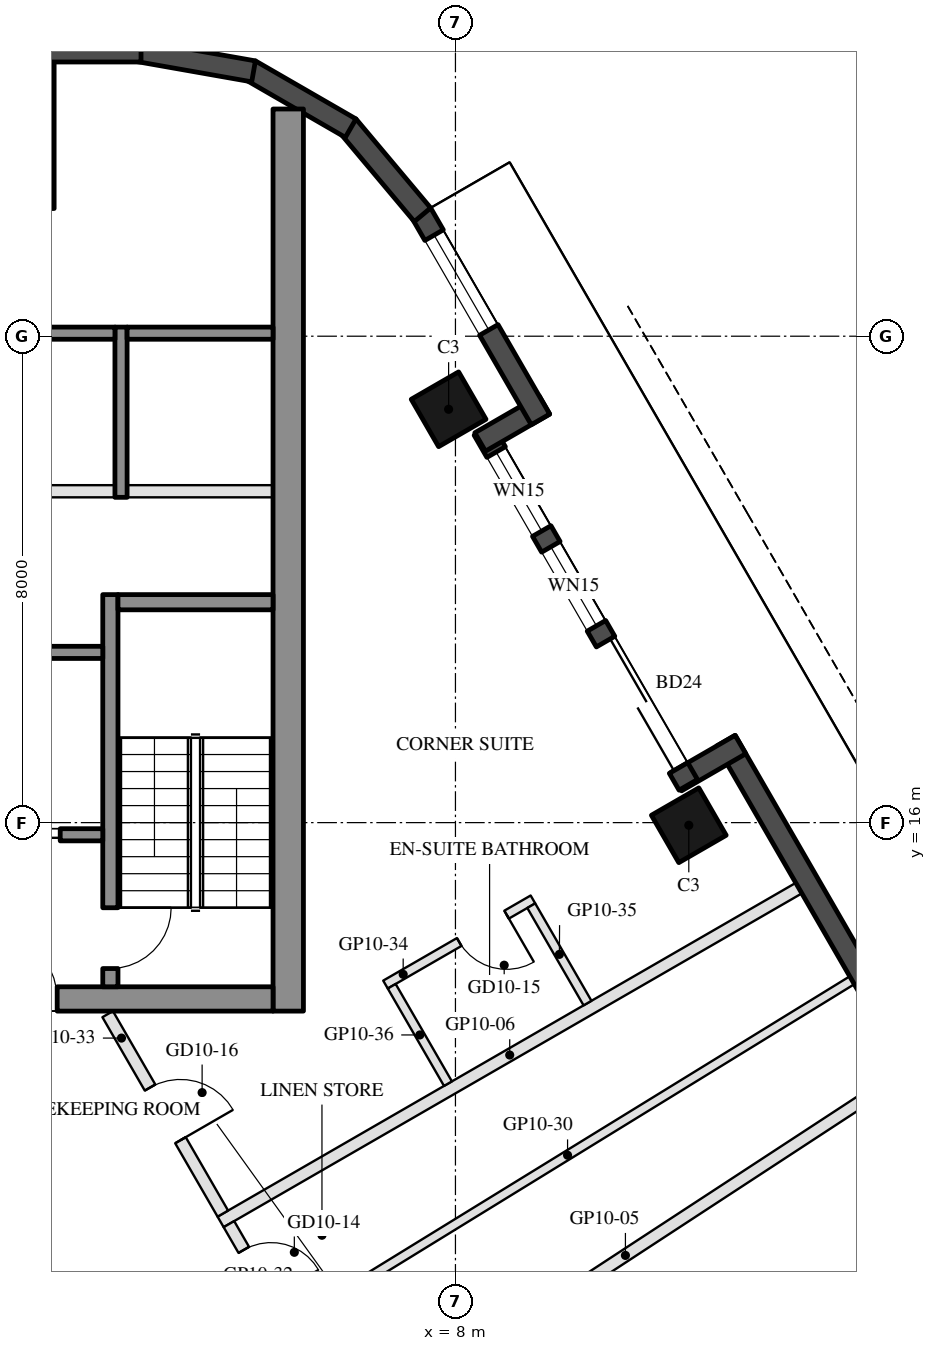
"""IFC4 building model, lengths in metres.
Left out: names, types, materials, properties, quantities, classifications, styles, units other than length and angle.
Written with IfcOpenShell. Run it as: python <this file> out.ifc"""

import sys

from ifc_helpers import new_model, si_unit, direction, frame, frame_2d, origin, origin_2d, place, context, subcontext, project, spatial, rectangle, hollow_rectangle, extrude, element, fill, save


model = new_model("IFC4")
c1 = context("Model", 3, precision=1e-05, world=origin(), true_north=direction((0.0, 1.0)))
c2 = subcontext(c1, "Body", "Model", "MODEL_VIEW")
j1 = project(units=[si_unit("LENGTHUNIT", "METRE"), si_unit("PLANEANGLEUNIT", "RADIAN")], contexts=[c1])
p1 = place(None, origin())
s1 = spatial("IfcSite", under=j1, at=p1, CompositionType="ELEMENT")
p2 = place(p1, origin())
s2 = spatial("IfcBuilding", under=s1, at=p2, CompositionType="ELEMENT")
p3 = place(p2, frame((0.0, 0.0, 116.8)))
s3 = spatial("IfcBuildingStorey", under=s2, at=p3, CompositionType="ELEMENT", Elevation=116.8)
for number, where, z_axis, x_axis in (
    (1, (11.838, 15.957, 0.0), (0.0, 0.0, 1.0), (-0.5, 0.866, 0.0)),
    (2, (7.888, 22.798, 0.0), (0.0, 0.0, 1.0), (-0.5, 0.866, 0.0)),
):
    element("IfcColumn", number, at=place(p3, frame(where, z_axis=z_axis, x_axis=x_axis)), inside=s3, PredefinedType="COLUMN", context=c2, shape_type="SweptSolid", body=[
        extrude(hollow_rectangle(XDim=0.9, YDim=0.9, WallThickness=0.04, at=origin_2d()), origin(), (0.0, 0.0, 1.0), 3.7),
    ])
p4 = place(p3, frame((0.0, 27.3, 0.0), z_axis=(0.0, 0.0, 1.0), x_axis=(1.0, 0.0, 0.0)))
e3 = element("IfcColumn", 3, at=p4, inside=s3, PredefinedType="COLUMN", context=c2, shape_type="SweptSolid", body=[
    extrude(hollow_rectangle(XDim=2.8, YDim=2.4, WallThickness=0.07, at=origin_2d()), origin(), (0.0, 0.0, 1.0), 3.7),
])
p5 = place(p3, frame((17.299, 8.948, 0.0), z_axis=(0.0, 0.0, 1.0), x_axis=(-0.500010041276, 0.866019606374, 0.0)))
e4 = element("IfcWall", 4, at=p5, inside=s3, PredefinedType="SOLIDWALL", context=c2, shape_type="SweptSolid", body=[
    extrude(rectangle(XDim=9.7, YDim=0.35, at=frame_2d((4.85, 0.0))), origin(), (0.0, 0.0, 1.0), 3.55),
])
p6 = place(p5, frame((1.725, 0.0, 0.0)))
e5 = element("IfcOpeningElement", 5, at=p6, cuts=e4, PredefinedType="OPENING", context=c2, shape_type="SweptSolid", body=[
    extrude(rectangle(XDim=1.3, YDim=2.4, at=frame_2d((0.65, 1.2))), frame((0.0, 0.185, 0.0), z_axis=(0.0, -1.0, 0.0), x_axis=(1.0, 0.0, 0.0)), (0.0, 0.0, 1.0), 0.37),
])
p7 = place(p3, frame((12.688, 17.284, 0.0), z_axis=(0.0, 0.0, 1.0), x_axis=(-0.865955602162, -0.500120880472, 0.0)))
e6 = element("IfcWall", 6, at=p7, inside=s3, PredefinedType="SOLIDWALL", context=c2, shape_type="SweptSolid", body=[
    extrude(rectangle(XDim=1.22, YDim=0.35, at=frame_2d((0.61, 0.0))), origin(), (0.0, 0.0, 1.0), 3.55),
])
p8 = place(p3, frame((11.829, 16.621, 0.0), z_axis=(0.0, 0.0, 1.0), x_axis=(-0.500003597184, 0.866023326939, 0.0)))
e7 = element("IfcWall", 7, at=p8, inside=s3, PredefinedType="SOLIDWALL", context=c2, shape_type="SweptSolid", body=[
    extrude(rectangle(XDim=6.74, YDim=0.35, at=frame_2d((3.37, 0.0))), origin(), (0.0, 0.0, 1.0), 3.55),
])
p9 = place(p8, frame((0.32, 0.0, 0.0)))
e8 = element("IfcOpeningElement", 8, at=p9, cuts=e7, PredefinedType="OPENING", context=c2, shape_type="SweptSolid", body=[
    extrude(rectangle(XDim=2.4, YDim=2.4, at=frame_2d((1.2, 1.2))), frame((0.0, 0.185, 0.0), z_axis=(0.0, -1.0, 0.0), x_axis=(1.0, 0.0, 0.0)), (0.0, 0.0, 1.0), 0.37),
])
p10 = place(p8, frame((3.02, 0.0, 0.3)))
e9 = element("IfcOpeningElement", 9, at=p10, cuts=e7, PredefinedType="OPENING", context=c2, shape_type="SweptSolid", body=[
    extrude(rectangle(XDim=1.5, YDim=2.65, at=frame_2d((0.75, 1.325))), frame((0.0, 0.185, 0.0), z_axis=(0.0, -1.0, 0.0), x_axis=(1.0, 0.0, 0.0)), (0.0, 0.0, 1.0), 0.37),
])
p11 = place(p8, frame((4.82, 0.0, 0.3)))
e10 = element("IfcOpeningElement", 10, at=p11, cuts=e7, PredefinedType="OPENING", context=c2, shape_type="SweptSolid", body=[
    extrude(rectangle(XDim=1.5, YDim=2.65, at=frame_2d((0.75, 1.325))), frame((0.0, 0.185, 0.0), z_axis=(0.0, -1.0, 0.0), x_axis=(1.0, 0.0, 0.0)), (0.0, 0.0, 1.0), 0.37),
])
p12 = place(p3, frame((8.406, 22.26, 0.0), z_axis=(0.0, 0.0, 1.0), x_axis=(0.865955602162, 0.500120880472, 0.0)))
e11 = element("IfcWall", 11, at=p12, inside=s3, PredefinedType="SOLIDWALL", context=c2, shape_type="SweptSolid", body=[
    extrude(rectangle(XDim=1.22, YDim=0.35, at=frame_2d((0.61, 0.0))), origin(), (0.0, 0.0, 1.0), 3.55),
])
p13 = place(p3, frame((9.398, 22.631, 0.0), z_axis=(0.0, 0.0, 1.0), x_axis=(-0.499954521343, 0.866051659307, 0.0)))
e12 = element("IfcWall", 12, at=p13, inside=s3, PredefinedType="SOLIDWALL", context=c2, shape_type="SweptSolid", body=[
    extrude(rectangle(XDim=3.916, YDim=0.35, at=frame_2d((1.958, 0.0))), origin(), (0.0, 0.0, 1.0), 3.55),
])
p14 = place(p13, frame((1.7, 0.0, 0.3)))
e13 = element("IfcOpeningElement", 13, at=p14, cuts=e12, PredefinedType="OPENING", context=c2, shape_type="SweptSolid", body=[
    extrude(rectangle(XDim=1.8, YDim=2.65, at=frame_2d((0.9, 1.325))), frame((0.0, 0.185, 0.0), z_axis=(0.0, -1.0, 0.0), x_axis=(1.0, 0.0, 0.0)), (0.0, 0.0, 1.0), 0.37),
])
p15 = place(p3, frame((7.458, 25.998, 0.0), z_axis=(0.0, 0.0, 1.0), x_axis=(-0.642808304945, 0.766027077259, 0.0)))
e14 = element("IfcWall", 14, at=p15, inside=s3, PredefinedType="SOLIDWALL", context=c2, shape_type="SweptSolid", body=[
    extrude(rectangle(XDim=1.91, YDim=0.35, at=frame_2d((0.955, 0.0))), origin(), (0.0, 0.0, 1.0), 3.55),
])
for number, where, z_axis, x_axis in (
    (15, (6.277, 27.422, 0.0), (0.0, 0.0, 1.0), (-0.866, 0.5, 0.0)),
    (16, (4.68, 28.356, 0.0), (0.0, 0.0, 1.0), (-0.985, 0.174, 0.0)),
):
    element("IfcWall", number, at=place(p3, frame(where, z_axis=z_axis, x_axis=x_axis)), inside=s3, PredefinedType="SOLIDWALL", context=c2, shape_type="SweptSolid", body=[
        extrude(rectangle(XDim=1.91, YDim=0.35, at=frame_2d((0.955, 0.0))), origin(), (0.0, 0.0, 1.0), 3.55),
    ])
p16 = place(p3, frame((2.829, 28.685, 0.0), z_axis=(0.0, 0.0, 1.0), x_axis=(-1.0, 0.0, 0.0)))
e17 = element("IfcWall", 17, at=p16, inside=s3, PredefinedType="SOLIDWALL", context=c2, shape_type="SweptSolid", body=[
    extrude(rectangle(XDim=5.658, YDim=0.35, at=frame_2d((2.829, 0.0))), origin(), (0.0, 0.0, 1.0), 3.55),
])
p17 = place(p3, frame((5.25, 12.9, 0.0), z_axis=(0.0, 0.0, 1.0), x_axis=(0.0, 1.0, 0.0)))
e18 = element("IfcWall", 18, at=p17, inside=s3, PredefinedType="SHEAR", context=c2, shape_type="SweptSolid", body=[
    extrude(rectangle(XDim=14.837, YDim=0.5, at=frame_2d((7.418, 0.0))), origin(), (0.0, 0.0, 1.0), 3.5),
])
p18 = place(p3, frame((5.0, 13.1, 0.0), z_axis=(0.0, 0.0, 1.0), x_axis=(-1.0, 0.0, 0.0)))
e19 = element("IfcWall", 19, at=p18, inside=s3, PredefinedType="SHEAR", context=c2, shape_type="SweptSolid", body=[
    extrude(rectangle(XDim=10.0, YDim=0.4, at=frame_2d((5.0, 0.0))), origin(), (0.0, 0.0, 1.0), 3.5),
])
p19 = place(p18, frame((3.55, 0.0, 0.0)))
e20 = element("IfcOpeningElement", 20, at=p19, cuts=e19, PredefinedType="OPENING", context=c2, shape_type="SweptSolid", body=[
    extrude(rectangle(XDim=1.1, YDim=2.1, at=frame_2d((0.55, 1.05))), frame((0.0, 0.21, 0.0), z_axis=(0.0, -1.0, 0.0), x_axis=(1.0, 0.0, 0.0)), (0.0, 0.0, 1.0), 0.42),
])
p20 = place(p18, frame((5.85, 0.0, 0.0)))
e21 = element("IfcOpeningElement", 21, at=p20, cuts=e19, PredefinedType="OPENING", context=c2, shape_type="SweptSolid", body=[
    extrude(rectangle(XDim=1.4, YDim=2.1, at=frame_2d((0.7, 1.05))), frame((0.0, 0.21, 0.0), z_axis=(0.0, -1.0, 0.0), x_axis=(1.0, 0.0, 0.0)), (0.0, 0.0, 1.0), 0.42),
])
p21 = place(p3, frame((2.325, 13.3, 0.0), z_axis=(0.0, 0.0, 1.0), x_axis=(0.0, 1.0, 0.0)))
e22 = element("IfcWall", 22, at=p21, inside=s3, PredefinedType="SHEAR", context=c2, shape_type="SweptSolid", body=[
    extrude(rectangle(XDim=6.45, YDim=0.25, at=frame_2d((3.225, 0.0))), origin(), (0.0, 0.0, 1.0), 3.5),
])
p22 = place(p21, frame((0.3, 0.0, 0.0)))
e23 = element("IfcOpeningElement", 23, at=p22, cuts=e22, PredefinedType="OPENING", context=c2, shape_type="SweptSolid", body=[
    extrude(rectangle(XDim=1.0, YDim=2.1, at=frame_2d((0.5, 1.05))), frame((0.0, 0.135, 0.0), z_axis=(0.0, -1.0, 0.0), x_axis=(1.0, 0.0, 0.0)), (0.0, 0.0, 1.0), 0.27),
])
p23 = place(p3, frame((5.0, 19.625, 0.0), z_axis=(0.0, 0.0, 1.0), x_axis=(-1.0, 0.0, 0.0)))
e24 = element("IfcWall", 24, at=p23, inside=s3, PredefinedType="SHEAR", context=c2, shape_type="SweptSolid", body=[
    extrude(rectangle(XDim=2.55, YDim=0.25, at=frame_2d((1.275, 0.0))), origin(), (0.0, 0.0, 1.0), 3.5),
])
p24 = place(p3, frame((2.2, 18.8, 0.0), z_axis=(0.0, 0.0, 1.0), x_axis=(-1.0, 0.0, 0.0)))
e25 = element("IfcWall", 25, at=p24, inside=s3, PredefinedType="SHEAR", context=c2, shape_type="SweptSolid", body=[
    extrude(rectangle(XDim=2.8, YDim=0.2, at=frame_2d((1.4, 0.0))), origin(), (0.0, 0.0, 1.0), 3.5),
])
p25 = place(p3, frame((2.2, 15.8, 0.0), z_axis=(0.0, 0.0, 1.0), x_axis=(-1.0, 0.0, 0.0)))
e26 = element("IfcWall", 26, at=p25, inside=s3, PredefinedType="SHEAR", context=c2, shape_type="SweptSolid", body=[
    extrude(rectangle(XDim=2.8, YDim=0.2, at=frame_2d((1.4, 0.0))), origin(), (0.0, 0.0, 1.0), 3.5),
])
p26 = place(p25, frame((0.7, 0.0, 0.0)))
e27 = element("IfcOpeningElement", 27, at=p26, cuts=e26, PredefinedType="OPENING", context=c2, shape_type="SweptSolid", body=[
    extrude(rectangle(XDim=1.2, YDim=2.1, at=frame_2d((0.6, 1.05))), frame((0.0, 0.11, 0.0), z_axis=(0.0, -1.0, 0.0), x_axis=(1.0, 0.0, 0.0)), (0.0, 0.0, 1.0), 0.22),
])
p27 = place(p3, frame((2.5, 21.35, 0.0), z_axis=(0.0, 0.0, 1.0), x_axis=(0.0, 1.0, 0.0)))
e28 = element("IfcWall", 28, at=p27, inside=s3, PredefinedType="SHEAR", context=c2, shape_type="SweptSolid", body=[
    extrude(rectangle(XDim=2.8, YDim=0.2, at=frame_2d((1.4, 0.0))), origin(), (0.0, 0.0, 1.0), 3.5),
])
p28 = place(p3, frame((5.0, 24.05, 0.0), z_axis=(0.0, 0.0, 1.0), x_axis=(-1.0, 0.0, 0.0)))
e29 = element("IfcWall", 29, at=p28, inside=s3, PredefinedType="SHEAR", context=c2, shape_type="SweptSolid", body=[
    extrude(rectangle(XDim=2.4, YDim=0.2, at=frame_2d((1.2, 0.0))), origin(), (0.0, 0.0, 1.0), 3.5),
])
p29 = place(p3, frame((2.4, 24.05, 0.0), z_axis=(0.0, 0.0, 1.0), x_axis=(-1.0, 0.0, 0.0)))
e30 = element("IfcWall", 30, at=p29, inside=s3, PredefinedType="SHEAR", context=c2, shape_type="SweptSolid", body=[
    extrude(rectangle(XDim=2.8, YDim=0.2, at=frame_2d((1.4, 0.0))), origin(), (0.0, 0.0, 1.0), 3.5),
])
p30 = place(p3, frame((5.0, 21.45, 0.0), z_axis=(0.0, 0.0, 1.0), x_axis=(-1.0, 0.0, 0.0)))
e31 = element("IfcWall", 31, at=p30, inside=s3, PredefinedType="PARTITIONING", context=c2, shape_type="SweptSolid", body=[
    extrude(rectangle(XDim=2.4, YDim=0.2, at=frame_2d((1.2, 0.0))), origin(), (0.0, 0.0, 1.0), 3.5),
])
p31 = place(p3, frame((2.4, 21.45, 0.0), z_axis=(0.0, 0.0, 1.0), x_axis=(-1.0, 0.0, 0.0)))
e32 = element("IfcWall", 32, at=p31, inside=s3, PredefinedType="PARTITIONING", context=c2, shape_type="SweptSolid", body=[
    extrude(rectangle(XDim=2.8, YDim=0.2, at=frame_2d((1.4, 0.0))), origin(), (0.0, 0.0, 1.0), 3.5),
])
p32 = place(p3, frame((15.397, 11.892, 0.0), z_axis=(0.0, 0.0, 1.0), x_axis=(-0.836898817878, -0.547357624076, 0.0)))
e33 = element("IfcWall", 33, at=p32, inside=s3, PredefinedType="PARTITIONING", context=c2, shape_type="SweptSolid", body=[
    extrude(rectangle(XDim=10.997, YDim=0.2, at=frame_2d((5.499, 0.0))), origin(), (0.0, 0.0, 1.0), 2.96),
])
p33 = place(p3, frame((13.647, 14.923, 0.0), z_axis=(0.0, 0.0, 1.0), x_axis=(-0.866027479907, -0.499996404033, 0.0)))
e34 = element("IfcWall", 34, at=p33, inside=s3, PredefinedType="PARTITIONING", context=c2, shape_type="SweptSolid", body=[
    extrude(rectangle(XDim=10.98, YDim=0.2, at=frame_2d((5.49, 0.0))), origin(), (0.0, 0.0, 1.0), 2.96),
])
p34 = place(p3, frame((14.522, 13.407, 0.0), z_axis=(0.0, 0.0, 1.0), x_axis=(-0.851781158383, -0.523897755506, 0.0)))
e35 = element("IfcWall", 35, at=p34, inside=s3, PredefinedType="PARTITIONING", context=c2, shape_type="SweptSolid", body=[
    extrude(rectangle(XDim=10.984, YDim=0.15, at=frame_2d((5.492, 0.0))), origin(), (0.0, 0.0, 1.0), 2.95),
])
p35 = place(p3, frame((4.275, 9.396, 0.0), z_axis=(0.0, 0.0, 1.0), x_axis=(0.499928798138, -0.866066508296, 0.0)))
e36 = element("IfcWall", 36, at=p35, inside=s3, PredefinedType="PARTITIONING", context=c2, shape_type="SweptSolid", body=[
    extrude(rectangle(XDim=1.878, YDim=0.2, at=frame_2d((0.939, 0.0))), origin(), (0.0, 0.0, 1.0), 3.55),
])
p36 = place(p35, frame((0.489, 0.0, 0.0)))
e37 = element("IfcOpeningElement", 37, at=p36, cuts=e36, PredefinedType="OPENING", context=c2, shape_type="SweptSolid", body=[
    extrude(rectangle(XDim=0.9, YDim=2.1, at=frame_2d((0.45, 1.05))), frame((0.0, 0.11, 0.0), z_axis=(0.0, -1.0, 0.0), x_axis=(1.0, 0.0, 0.0)), (0.0, 0.0, 1.0), 0.22),
])
p37 = place(p3, frame((2.281, 12.85, 0.0), z_axis=(0.0, 0.0, 1.0), x_axis=(0.499979074716, -0.866037484666, 0.0)))
e38 = element("IfcWall", 38, at=p37, inside=s3, PredefinedType="PARTITIONING", context=c2, shape_type="SweptSolid", body=[
    extrude(rectangle(XDim=3.788, YDim=0.2, at=frame_2d((1.894, 0.0))), origin(), (0.0, 0.0, 1.0), 2.95),
])
p38 = place(p37, frame((1.394, 0.0, 0.0)))
e39 = element("IfcOpeningElement", 39, at=p38, cuts=e38, PredefinedType="OPENING", context=c2, shape_type="SweptSolid", body=[
    extrude(rectangle(XDim=1.0, YDim=2.1, at=frame_2d((0.5, 1.05))), frame((0.0, 0.11, 0.0), z_axis=(0.0, -1.0, 0.0), x_axis=(1.0, 0.0, 0.0)), (0.0, 0.0, 1.0), 0.22),
])
p39 = place(p3, frame((9.274, 14.737, 0.0), z_axis=(0.0, 0.0, 1.0), x_axis=(-0.866018616679, -0.500011755427, 0.0)))
e40 = element("IfcWall", 40, at=p39, inside=s3, PredefinedType="PARTITIONING", context=c2, shape_type="SweptSolid", body=[
    extrude(rectangle(XDim=2.8, YDim=0.15, at=frame_2d((1.4, 0.0))), origin(), (0.0, 0.0, 1.0), 3.55),
])
p40 = place(p39, frame((0.5, 0.0, 0.0)))
e41 = element("IfcOpeningElement", 41, at=p40, cuts=e40, PredefinedType="OPENING", context=c2, shape_type="SweptSolid", body=[
    extrude(rectangle(XDim=0.9, YDim=2.1, at=frame_2d((0.45, 1.05))), frame((0.0, 0.085, 0.0), z_axis=(0.0, -1.0, 0.0), x_axis=(1.0, 0.0, 0.0)), (0.0, 0.0, 1.0), 0.17),
])
p41 = place(p3, frame((10.172, 13.032, 0.0), z_axis=(0.0, 0.0, 1.0), x_axis=(-0.500042316284, 0.866000971088, 0.0)))
e42 = element("IfcWall", 42, at=p41, inside=s3, PredefinedType="PARTITIONING", context=c2, shape_type="SweptSolid", body=[
    extrude(rectangle(XDim=1.85, YDim=0.15, at=frame_2d((0.925, 0.0))), origin(), (0.0, 0.0, 1.0), 2.95),
])
p42 = place(p3, frame((7.877, 11.707, 0.0), z_axis=(0.0, 0.0, 1.0), x_axis=(-0.499985172903, 0.866033964044, 0.0)))
e43 = element("IfcWall", 43, at=p42, inside=s3, PredefinedType="PARTITIONING", context=c2, shape_type="SweptSolid", body=[
    extrude(rectangle(XDim=1.85, YDim=0.15, at=frame_2d((0.925, 0.0))), origin(), (0.0, 0.0, 1.0), 2.95),
])
p43 = place(p9, frame((2.4, 0.0, 0.0), z_axis=(0.0, 0.0, 1.0), x_axis=(-1.0, 0.0, 0.0)))
e44 = element("IfcDoor", 44, at=p43, inside=s3, OperationType="SLIDING_TO_LEFT", PredefinedType="DOOR", context=c2, shape_type="SweptSolid", body=[
    extrude(rectangle(XDim=2.4, YDim=2.4, at=frame_2d((1.2, 1.2))), frame((0.0, 0.025, 0.0), z_axis=(0.0, -1.0, 0.0), x_axis=(1.0, 0.0, 0.0)), (0.0, 0.0, 1.0), 0.05),
])
fill(e8, e44)
p44 = place(p10, origin())
e45 = element("IfcWindow", 45, at=p44, inside=s3, PartitioningType="SINGLE_PANEL", PredefinedType="WINDOW", context=c2, shape_type="SweptSolid", body=[
    extrude(rectangle(XDim=1.5, YDim=2.65, at=frame_2d((0.75, 1.325))), frame((0.0, 0.03, 0.0), z_axis=(0.0, -1.0, 0.0), x_axis=(1.0, 0.0, 0.0)), (0.0, 0.0, 1.0), 0.06),
])
fill(e9, e45)
p45 = place(p11, origin())
e46 = element("IfcWindow", 46, at=p45, inside=s3, PartitioningType="SINGLE_PANEL", PredefinedType="WINDOW", context=c2, shape_type="SweptSolid", body=[
    extrude(rectangle(XDim=1.5, YDim=2.65, at=frame_2d((0.75, 1.325))), frame((0.0, 0.03, 0.0), z_axis=(0.0, -1.0, 0.0), x_axis=(1.0, 0.0, 0.0)), (0.0, 0.0, 1.0), 0.06),
])
fill(e10, e46)
p46 = place(p14, origin())
e47 = element("IfcWindow", 47, at=p46, inside=s3, PartitioningType="SINGLE_PANEL", PredefinedType="WINDOW", context=c2, shape_type="SweptSolid", body=[
    extrude(rectangle(XDim=1.8, YDim=2.65, at=frame_2d((0.9, 1.325))), frame((0.0, 0.03, 0.0), z_axis=(0.0, -1.0, 0.0), x_axis=(1.0, 0.0, 0.0)), (0.0, 0.0, 1.0), 0.06),
])
fill(e13, e47)
p47 = place(p26, origin())
e48 = element("IfcDoor", 48, at=p47, inside=s3, OperationType="DOUBLE_DOOR_SLIDING", PredefinedType="DOOR", context=c2, shape_type="SweptSolid", body=[
    extrude(rectangle(XDim=1.2, YDim=2.1, at=frame_2d((0.6, 1.05))), frame((0.0, 0.025, 0.0), z_axis=(0.0, -1.0, 0.0), x_axis=(1.0, 0.0, 0.0)), (0.0, 0.0, 1.0), 0.05),
])
fill(e27, e48)
p48 = place(p19, frame((1.1, 0.0, 0.0), z_axis=(0.0, 0.0, 1.0), x_axis=(-1.0, 0.0, 0.0)))
e49 = element("IfcDoor", 49, at=p48, inside=s3, OperationType="SINGLE_SWING_LEFT", PredefinedType="DOOR", context=c2, shape_type="SweptSolid", body=[
    extrude(rectangle(XDim=1.1, YDim=2.1, at=frame_2d((0.55, 1.05))), frame((0.0, 0.025, 0.0), z_axis=(0.0, -1.0, 0.0), x_axis=(1.0, 0.0, 0.0)), (0.0, 0.0, 1.0), 0.05),
])
fill(e20, e49)
p49 = place(p22, frame((1.0, 0.0, 0.0), z_axis=(0.0, 0.0, 1.0), x_axis=(-1.0, 0.0, 0.0)))
e50 = element("IfcDoor", 50, at=p49, inside=s3, OperationType="SINGLE_SWING_LEFT", PredefinedType="DOOR", context=c2, shape_type="SweptSolid", body=[
    extrude(rectangle(XDim=1.0, YDim=2.1, at=frame_2d((0.5, 1.05))), frame((0.0, 0.025, 0.0), z_axis=(0.0, -1.0, 0.0), x_axis=(1.0, 0.0, 0.0)), (0.0, 0.0, 1.0), 0.05),
])
fill(e23, e50)
p50 = place(p36, origin())
e51 = element("IfcDoor", 51, at=p50, inside=s3, OperationType="SINGLE_SWING_RIGHT", PredefinedType="DOOR", context=c2, shape_type="SweptSolid", body=[
    extrude(rectangle(XDim=0.9, YDim=2.1, at=frame_2d((0.45, 1.05))), frame((0.0, 0.025, 0.0), z_axis=(0.0, -1.0, 0.0), x_axis=(1.0, 0.0, 0.0)), (0.0, 0.0, 1.0), 0.05),
])
fill(e37, e51)
p51 = place(p40, origin())
e52 = element("IfcDoor", 52, at=p51, inside=s3, OperationType="SINGLE_SWING_LEFT", PredefinedType="DOOR", context=c2, shape_type="SweptSolid", body=[
    extrude(rectangle(XDim=0.9, YDim=2.1, at=frame_2d((0.45, 1.05))), frame((0.0, 0.025, 0.0), z_axis=(0.0, -1.0, 0.0), x_axis=(1.0, 0.0, 0.0)), (0.0, 0.0, 1.0), 0.05),
])
fill(e41, e52)
p52 = place(p38, origin())
e53 = element("IfcDoor", 53, at=p52, inside=s3, OperationType="SINGLE_SWING_RIGHT", PredefinedType="DOOR", context=c2, shape_type="SweptSolid", body=[
    extrude(rectangle(XDim=1.0, YDim=2.1, at=frame_2d((0.5, 1.05))), frame((0.0, 0.025, 0.0), z_axis=(0.0, -1.0, 0.0), x_axis=(1.0, 0.0, 0.0)), (0.0, 0.0, 1.0), 0.05),
])
fill(e39, e53)
save(model, sys.argv[1])
